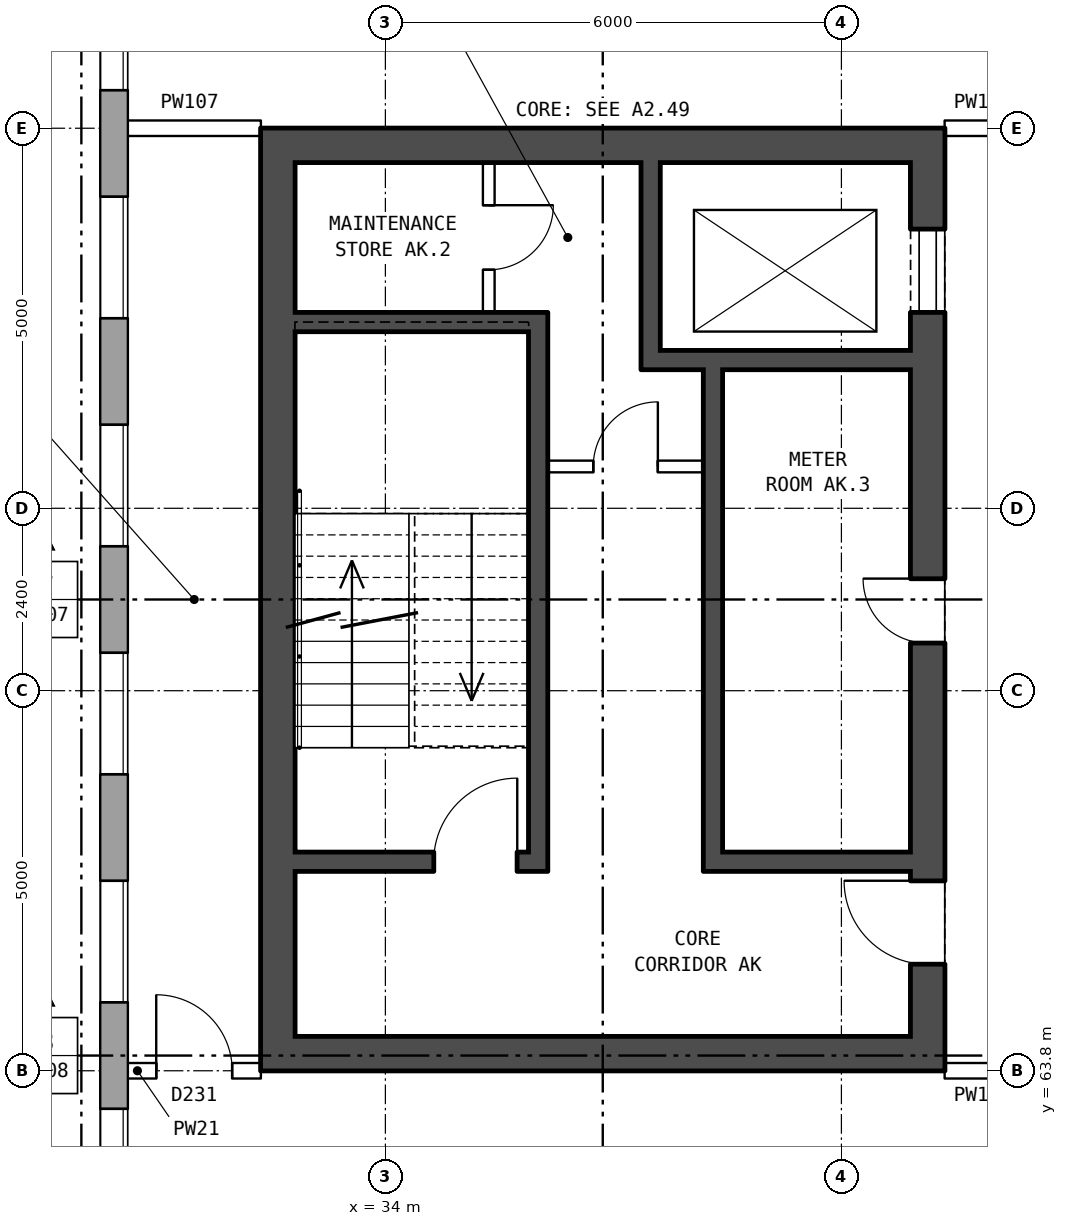
"""IFC4 building model, lengths in metres.
Left out: names, types, materials, properties, quantities, classifications, styles, units other than length and angle.
Written with IfcOpenShell. Run it as: python <this file> out.ifc"""

import sys

from ifc_helpers import new_model, si_unit, direction, frame, frame_2d, origin, place, context, subcontext, project, spatial, rectangle, extrude, element, fill, save


model = new_model("IFC4")
c1 = context("Model", 3, precision=1e-05, world=origin(), true_north=direction((0.0, 1.0)))
c2 = subcontext(c1, "Body", "Model", "MODEL_VIEW")
j1 = project(units=[si_unit("LENGTHUNIT", "METRE"), si_unit("PLANEANGLEUNIT", "RADIAN")], contexts=[c1])
p1 = place(None, origin())
s1 = spatial("IfcSite", under=j1, at=p1, CompositionType="ELEMENT")
p2 = place(p1, origin())
s2 = spatial("IfcBuilding", under=s1, at=p2, CompositionType="ELEMENT")
p3 = place(p2, frame((0.0, 0.0, 171.6)))
s3 = spatial("IfcBuildingStorey", under=s2, at=p3, CompositionType="ELEMENT", Elevation=171.6)
p4 = place(p3, frame((30.43, 82.925, 0.0), z_axis=(0.0, 0.0, 1.0), x_axis=(0.0, -1.0, 0.0)))
e1 = element("IfcWall", 1, at=p4, inside=s3, PredefinedType="STANDARD", context=c2, shape_type="SweptSolid", body=[
    extrude(rectangle(XDim=25.851, YDim=0.36, at=frame_2d((12.925, 0.0))), origin(), (0.0, 0.0, 1.0), 3.6),
])
p5 = place(p4, frame((1.625, 0.0, 0.8)))
e2 = element("IfcOpeningElement", 2, at=p5, cuts=e1, PredefinedType="OPENING", context=c2, shape_type="SweptSolid", body=[
    extrude(rectangle(XDim=1.6, YDim=1.8, at=frame_2d((0.8, 0.9))), frame((0.0, 0.19, 0.0), z_axis=(0.0, -1.0, 0.0), x_axis=(1.0, 0.0, 0.0)), (0.0, 0.0, 1.0), 0.38),
])
p6 = place(p4, frame((4.625, 0.0, 0.8)))
e3 = element("IfcOpeningElement", 3, at=p6, cuts=e1, PredefinedType="OPENING", context=c2, shape_type="SweptSolid", body=[
    extrude(rectangle(XDim=1.6, YDim=1.8, at=frame_2d((0.8, 0.9))), frame((0.0, 0.19, 0.0), z_axis=(0.0, -1.0, 0.0), x_axis=(1.0, 0.0, 0.0)), (0.0, 0.0, 1.0), 0.38),
])
p7 = place(p4, frame((7.625, 0.0, 0.8)))
e4 = element("IfcOpeningElement", 4, at=p7, cuts=e1, PredefinedType="OPENING", context=c2, shape_type="SweptSolid", body=[
    extrude(rectangle(XDim=1.6, YDim=1.8, at=frame_2d((0.8, 0.9))), frame((0.0, 0.19, 0.0), z_axis=(0.0, -1.0, 0.0), x_axis=(1.0, 0.0, 0.0)), (0.0, 0.0, 1.0), 0.38),
])
p8 = place(p4, frame((10.625, 0.0, 0.8)))
e5 = element("IfcOpeningElement", 5, at=p8, cuts=e1, PredefinedType="OPENING", context=c2, shape_type="SweptSolid", body=[
    extrude(rectangle(XDim=1.6, YDim=1.8, at=frame_2d((0.8, 0.9))), frame((0.0, 0.19, 0.0), z_axis=(0.0, -1.0, 0.0), x_axis=(1.0, 0.0, 0.0)), (0.0, 0.0, 1.0), 0.38),
])
p9 = place(p4, frame((13.625, 0.0, 0.8)))
e6 = element("IfcOpeningElement", 6, at=p9, cuts=e1, PredefinedType="OPENING", context=c2, shape_type="SweptSolid", body=[
    extrude(rectangle(XDim=1.6, YDim=1.8, at=frame_2d((0.8, 0.9))), frame((0.0, 0.19, 0.0), z_axis=(0.0, -1.0, 0.0), x_axis=(1.0, 0.0, 0.0)), (0.0, 0.0, 1.0), 0.38),
])
p10 = place(p4, frame((16.625, 0.0, 0.8)))
e7 = element("IfcOpeningElement", 7, at=p10, cuts=e1, PredefinedType="OPENING", context=c2, shape_type="SweptSolid", body=[
    extrude(rectangle(XDim=1.6, YDim=1.8, at=frame_2d((0.8, 0.9))), frame((0.0, 0.19, 0.0), z_axis=(0.0, -1.0, 0.0), x_axis=(1.0, 0.0, 0.0)), (0.0, 0.0, 1.0), 0.38),
])
p11 = place(p4, frame((19.625, 0.0, 0.8)))
e8 = element("IfcOpeningElement", 8, at=p11, cuts=e1, PredefinedType="OPENING", context=c2, shape_type="SweptSolid", body=[
    extrude(rectangle(XDim=1.6, YDim=1.8, at=frame_2d((0.8, 0.9))), frame((0.0, 0.19, 0.0), z_axis=(0.0, -1.0, 0.0), x_axis=(1.0, 0.0, 0.0)), (0.0, 0.0, 1.0), 0.38),
])
p12 = place(p4, frame((22.625, 0.0, 0.8)))
e9 = element("IfcOpeningElement", 9, at=p12, cuts=e1, PredefinedType="OPENING", context=c2, shape_type="SweptSolid", body=[
    extrude(rectangle(XDim=1.6, YDim=1.8, at=frame_2d((0.8, 0.9))), frame((0.0, 0.19, 0.0), z_axis=(0.0, -1.0, 0.0), x_axis=(1.0, 0.0, 0.0)), (0.0, 0.0, 1.0), 0.38),
])
p13 = place(p3, frame((41.135, 76.2, 0.0), z_axis=(0.0, 0.0, 1.0), x_axis=(0.0, -1.0, 0.0)))
e10 = element("IfcWall", 10, at=p13, inside=s3, PredefinedType="SHEAR", context=c2, shape_type="SweptSolid", body=[
    extrude(rectangle(XDim=12.4, YDim=0.45, at=frame_2d((6.2, 0.0))), origin(), (0.0, 0.0, 1.0), 3.6),
])
p14 = place(p13, frame((1.325, 0.0, 0.0)))
e11 = element("IfcOpeningElement", 11, at=p14, cuts=e10, PredefinedType="OPENING", context=c2, shape_type="SweptSolid", body=[
    extrude(rectangle(XDim=1.1, YDim=2.1, at=frame_2d((0.55, 1.05))), frame((0.0, 0.235, 0.0), z_axis=(0.0, -1.0, 0.0), x_axis=(1.0, 0.0, 0.0)), (0.0, 0.0, 1.0), 0.47),
])
p15 = place(p13, frame((5.925, 0.0, 0.0)))
e12 = element("IfcOpeningElement", 12, at=p15, cuts=e10, PredefinedType="OPENING", context=c2, shape_type="SweptSolid", body=[
    extrude(rectangle(XDim=0.85, YDim=2.1, at=frame_2d((0.425, 1.05))), frame((0.0, 0.235, 0.0), z_axis=(0.0, -1.0, 0.0), x_axis=(1.0, 0.0, 0.0)), (0.0, 0.0, 1.0), 0.47),
])
p16 = place(p13, frame((9.9, 0.0, 0.0)))
e13 = element("IfcOpeningElement", 13, at=p16, cuts=e10, PredefinedType="OPENING", context=c2, shape_type="SweptSolid", body=[
    extrude(rectangle(XDim=1.1, YDim=2.1, at=frame_2d((0.55, 1.05))), frame((0.0, 0.235, 0.0), z_axis=(0.0, -1.0, 0.0), x_axis=(1.0, 0.0, 0.0)), (0.0, 0.0, 1.0), 0.47),
])
p17 = place(p3, frame((32.585, 76.2, 0.0), z_axis=(0.0, 0.0, 1.0), x_axis=(0.0, -1.0, 0.0)))
e14 = element("IfcWall", 14, at=p17, inside=s3, PredefinedType="SHEAR", context=c2, shape_type="SweptSolid", body=[
    extrude(rectangle(XDim=12.4, YDim=0.45, at=frame_2d((6.2, 0.0))), origin(), (0.0, 0.0, 1.0), 3.6),
])
for number, where, z_axis, x_axis in (
    (15, (40.91, 75.975, 0.0), (0.0, 0.0, 1.0), (-1.0, 0.0, 0.0)),
    (16, (40.91, 64.025, 0.0), (0.0, 0.0, 1.0), (-1.0, 0.0, 0.0)),
):
    element("IfcWall", number, at=place(p3, frame(where, z_axis=z_axis, x_axis=x_axis)), inside=s3, PredefinedType="SHEAR", context=c2, shape_type="SweptSolid", body=[
        extrude(rectangle(XDim=8.1, YDim=0.45, at=frame_2d((4.05, 0.0))), origin(), (0.0, 0.0, 1.0), 3.6),
    ])
p18 = place(p3, frame((35.885, 73.65, 0.0), z_axis=(0.0, 0.0, 1.0), x_axis=(-1.0, 0.0, 0.0)))
e17 = element("IfcWall", 17, at=p18, inside=s3, PredefinedType="SHEAR", context=c2, shape_type="SweptSolid", body=[
    extrude(rectangle(XDim=3.075, YDim=0.25, at=frame_2d((1.538, 0.0))), origin(), (0.0, 0.0, 1.0), 3.6),
])
p19 = place(p3, frame((40.91, 73.15, 0.0), z_axis=(0.0, 0.0, 1.0), x_axis=(-1.0, 0.0, 0.0)))
e18 = element("IfcWall", 18, at=p19, inside=s3, PredefinedType="SHEAR", context=c2, shape_type="SweptSolid", body=[
    extrude(rectangle(XDim=3.545, YDim=0.25, at=frame_2d((1.772, 0.0))), origin(), (0.0, 0.0, 1.0), 3.6),
])
p20 = place(p3, frame((38.185, 71.75, 0.0), z_axis=(0.0, 0.0, 1.0), x_axis=(-1.0, 0.0, 0.0)))
e19 = element("IfcWall", 19, at=p20, inside=s3, PredefinedType="PARTITIONING", context=c2, shape_type="SweptSolid", body=[
    extrude(rectangle(XDim=2.05, YDim=0.15, at=frame_2d((1.025, 0.0))), origin(), (0.0, 0.0, 1.0), 3.6),
])
p21 = place(p20, frame((0.6, 0.0, 0.0)))
e20 = element("IfcOpeningElement", 20, at=p21, cuts=e19, PredefinedType="OPENING", context=c2, shape_type="SweptSolid", body=[
    extrude(rectangle(XDim=0.85, YDim=2.1, at=frame_2d((0.425, 1.05))), frame((0.0, 0.085, 0.0), z_axis=(0.0, -1.0, 0.0), x_axis=(1.0, 0.0, 0.0)), (0.0, 0.0, 1.0), 0.17),
])
p22 = place(p3, frame((40.91, 66.55, 0.0), z_axis=(0.0, 0.0, 1.0), x_axis=(-1.0, 0.0, 0.0)))
e21 = element("IfcWall", 21, at=p22, inside=s3, PredefinedType="SHEAR", context=c2, shape_type="SweptSolid", body=[
    extrude(rectangle(XDim=2.475, YDim=0.25, at=frame_2d((1.237, 0.0))), origin(), (0.0, 0.0, 1.0), 3.6),
])
p23 = place(p3, frame((35.885, 66.55, 0.0), z_axis=(0.0, 0.0, 1.0), x_axis=(-1.0, 0.0, 0.0)))
e22 = element("IfcWall", 22, at=p23, inside=s3, PredefinedType="SHEAR", context=c2, shape_type="SweptSolid", body=[
    extrude(rectangle(XDim=3.075, YDim=0.25, at=frame_2d((1.538, 0.0))), origin(), (0.0, 0.0, 1.0), 3.6),
])
p24 = place(p23, frame((0.15, 0.0, 0.0)))
e23 = element("IfcOpeningElement", 23, at=p24, cuts=e22, PredefinedType="OPENING", context=c2, shape_type="SweptSolid", body=[
    extrude(rectangle(XDim=1.1, YDim=2.1, at=frame_2d((0.55, 1.05))), frame((0.0, 0.135, 0.0), z_axis=(0.0, -1.0, 0.0), x_axis=(1.0, 0.0, 0.0)), (0.0, 0.0, 1.0), 0.27),
])
p25 = place(p3, frame((38.31, 73.025, 0.0), z_axis=(0.0, 0.0, 1.0), x_axis=(0.0, -1.0, 0.0)))
e24 = element("IfcWall", 24, at=p25, inside=s3, PredefinedType="SHEAR", context=c2, shape_type="SweptSolid", body=[
    extrude(rectangle(XDim=6.6, YDim=0.25, at=frame_2d((3.3, 0.0))), origin(), (0.0, 0.0, 1.0), 3.6),
])
p26 = place(p3, frame((37.49, 75.75, 0.0), z_axis=(0.0, 0.0, 1.0), x_axis=(0.0, -1.0, 0.0)))
e25 = element("IfcWall", 25, at=p26, inside=s3, PredefinedType="SHEAR", context=c2, shape_type="SweptSolid", body=[
    extrude(rectangle(XDim=2.475, YDim=0.25, at=frame_2d((1.238, 0.0))), origin(), (0.0, 0.0, 1.0), 3.6),
])
p27 = place(p3, frame((36.01, 73.775, 0.0), z_axis=(0.0, 0.0, 1.0), x_axis=(0.0, -1.0, 0.0)))
e26 = element("IfcWall", 26, at=p27, inside=s3, PredefinedType="SHEAR", context=c2, shape_type="SweptSolid", body=[
    extrude(rectangle(XDim=7.35, YDim=0.25, at=frame_2d((3.675, 0.0))), origin(), (0.0, 0.0, 1.0), 3.6),
])
p28 = place(p3, frame((35.36, 75.75, 0.0), z_axis=(0.0, 0.0, 1.0), x_axis=(0.0, -1.0, 0.0)))
e27 = element("IfcWall", 27, at=p28, inside=s3, PredefinedType="PARTITIONING", context=c2, shape_type="SweptSolid", body=[
    extrude(rectangle(XDim=1.975, YDim=0.15, at=frame_2d((0.988, 0.0))), origin(), (0.0, 0.0, 1.0), 3.6),
])
p29 = place(p28, frame((0.562, 0.0, 0.0)))
e28 = element("IfcOpeningElement", 28, at=p29, cuts=e27, PredefinedType="OPENING", context=c2, shape_type="SweptSolid", body=[
    extrude(rectangle(XDim=0.85, YDim=2.1, at=frame_2d((0.425, 1.05))), frame((0.0, 0.085, 0.0), z_axis=(0.0, -1.0, 0.0), x_axis=(1.0, 0.0, 0.0)), (0.0, 0.0, 1.0), 0.17),
])
p30 = place(p3, frame((30.49, 63.8, 0.0), z_axis=(0.0, 0.0, 1.0), x_axis=(1.0, 0.0, 0.0)))
e29 = element("IfcWall", 29, at=p30, inside=s3, PredefinedType="PARTITIONING", context=c2, shape_type="SweptSolid", body=[
    extrude(rectangle(XDim=1.87, YDim=0.2, at=frame_2d((0.935, 0.0))), origin(), (0.0, 0.0, 1.0), 3.6),
])
p31 = place(p30, frame((0.495, 0.0, 0.0)))
e30 = element("IfcOpeningElement", 30, at=p31, cuts=e29, PredefinedType="OPENING", context=c2, shape_type="SweptSolid", body=[
    extrude(rectangle(XDim=1.0, YDim=2.1, at=frame_2d((0.5, 1.05))), frame((0.0, 0.11, 0.0), z_axis=(0.0, -1.0, 0.0), x_axis=(1.0, 0.0, 0.0)), (0.0, 0.0, 1.0), 0.22),
])
p32 = place(p3, frame((41.36, 63.8, 0.0), z_axis=(0.0, 0.0, 1.0), x_axis=(1.0, 0.0, 0.0)))
e31 = element("IfcWall", 31, at=p32, inside=s3, PredefinedType="PARTITIONING", context=c2, shape_type="SweptSolid", body=[
    extrude(rectangle(XDim=3.0, YDim=0.2, at=frame_2d((1.5, 0.0))), origin(), (0.0, 0.0, 1.0), 3.6),
])
p33 = place(p32, frame((1.0, 0.0, 0.0)))
e32 = element("IfcOpeningElement", 32, at=p33, cuts=e31, PredefinedType="OPENING", context=c2, shape_type="SweptSolid", body=[
    extrude(rectangle(XDim=1.0, YDim=2.1, at=frame_2d((0.5, 1.05))), frame((0.0, 0.11, 0.0), z_axis=(0.0, -1.0, 0.0), x_axis=(1.0, 0.0, 0.0)), (0.0, 0.0, 1.0), 0.22),
])
p34 = place(p3, frame((30.49, 76.2, 0.0), z_axis=(0.0, 0.0, 1.0), x_axis=(1.0, 0.0, 0.0)))
e33 = element("IfcWall", 33, at=p34, inside=s3, PredefinedType="PARTITIONING", context=c2, shape_type="SweptSolid", body=[
    extrude(rectangle(XDim=1.87, YDim=0.2, at=frame_2d((0.935, 0.0))), origin(), (0.0, 0.0, 1.0), 3.6),
])
p35 = place(p3, frame((41.36, 76.2, 0.0), z_axis=(0.0, 0.0, 1.0), x_axis=(1.0, 0.0, 0.0)))
e34 = element("IfcWall", 34, at=p35, inside=s3, PredefinedType="PARTITIONING", context=c2, shape_type="SweptSolid", body=[
    extrude(rectangle(XDim=3.0, YDim=0.2, at=frame_2d((1.5, 0.0))), origin(), (0.0, 0.0, 1.0), 3.6),
])
p36 = place(p35, frame((1.0, 0.0, 0.0)))
e35 = element("IfcOpeningElement", 35, at=p36, cuts=e34, PredefinedType="OPENING", context=c2, shape_type="SweptSolid", body=[
    extrude(rectangle(XDim=1.0, YDim=2.1, at=frame_2d((0.5, 1.05))), frame((0.0, 0.11, 0.0), z_axis=(0.0, -1.0, 0.0), x_axis=(1.0, 0.0, 0.0)), (0.0, 0.0, 1.0), 0.22),
])
p37 = place(p6, origin())
e36 = element("IfcWindow", 36, at=p37, inside=s3, PartitioningType="SINGLE_PANEL", PredefinedType="WINDOW", context=c2, shape_type="SweptSolid", body=[
    extrude(rectangle(XDim=1.6, YDim=1.8, at=frame_2d((0.8, 0.9))), frame((0.0, 0.15, 0.0), z_axis=(0.0, -1.0, 0.0), x_axis=(1.0, 0.0, 0.0)), (0.0, 0.0, 1.0), 0.06),
])
fill(e3, e36)
p38 = place(p7, origin())
e37 = element("IfcWindow", 37, at=p38, inside=s3, PartitioningType="SINGLE_PANEL", PredefinedType="WINDOW", context=c2, shape_type="SweptSolid", body=[
    extrude(rectangle(XDim=1.6, YDim=1.8, at=frame_2d((0.8, 0.9))), frame((0.0, 0.15, 0.0), z_axis=(0.0, -1.0, 0.0), x_axis=(1.0, 0.0, 0.0)), (0.0, 0.0, 1.0), 0.06),
])
fill(e4, e37)
p39 = place(p8, origin())
e38 = element("IfcWindow", 38, at=p39, inside=s3, PartitioningType="SINGLE_PANEL", PredefinedType="WINDOW", context=c2, shape_type="SweptSolid", body=[
    extrude(rectangle(XDim=1.6, YDim=1.8, at=frame_2d((0.8, 0.9))), frame((0.0, 0.15, 0.0), z_axis=(0.0, -1.0, 0.0), x_axis=(1.0, 0.0, 0.0)), (0.0, 0.0, 1.0), 0.06),
])
fill(e5, e38)
p40 = place(p9, origin())
e39 = element("IfcWindow", 39, at=p40, inside=s3, PartitioningType="SINGLE_PANEL", PredefinedType="WINDOW", context=c2, shape_type="SweptSolid", body=[
    extrude(rectangle(XDim=1.6, YDim=1.8, at=frame_2d((0.8, 0.9))), frame((0.0, 0.15, 0.0), z_axis=(0.0, -1.0, 0.0), x_axis=(1.0, 0.0, 0.0)), (0.0, 0.0, 1.0), 0.06),
])
fill(e6, e39)
p41 = place(p10, origin())
e40 = element("IfcWindow", 40, at=p41, inside=s3, PartitioningType="SINGLE_PANEL", PredefinedType="WINDOW", context=c2, shape_type="SweptSolid", body=[
    extrude(rectangle(XDim=1.6, YDim=1.8, at=frame_2d((0.8, 0.9))), frame((0.0, 0.15, 0.0), z_axis=(0.0, -1.0, 0.0), x_axis=(1.0, 0.0, 0.0)), (0.0, 0.0, 1.0), 0.06),
])
fill(e7, e40)
p42 = place(p11, origin())
e41 = element("IfcWindow", 41, at=p42, inside=s3, PartitioningType="SINGLE_PANEL", PredefinedType="WINDOW", context=c2, shape_type="SweptSolid", body=[
    extrude(rectangle(XDim=1.6, YDim=1.8, at=frame_2d((0.8, 0.9))), frame((0.0, 0.15, 0.0), z_axis=(0.0, -1.0, 0.0), x_axis=(1.0, 0.0, 0.0)), (0.0, 0.0, 1.0), 0.06),
])
fill(e8, e41)
p43 = place(p14, origin())
e42 = element("IfcDoor", 42, at=p43, inside=s3, OperationType="DOUBLE_DOOR_SLIDING", PredefinedType="DOOR", context=c2, shape_type="SweptSolid", body=[
    extrude(rectangle(XDim=1.1, YDim=2.1, at=frame_2d((0.55, 1.05))), frame((0.0, -0.16, 0.0), z_axis=(0.0, -1.0, 0.0), x_axis=(1.0, 0.0, 0.0)), (0.0, 0.0, 1.0), 0.05),
])
fill(e11, e42)
p44 = place(p15, frame((0.85, 0.0, 0.0), z_axis=(0.0, 0.0, 1.0), x_axis=(-1.0, 0.0, 0.0)))
e43 = element("IfcDoor", 43, at=p44, inside=s3, OperationType="SINGLE_SWING_RIGHT", PredefinedType="DOOR", context=c2, shape_type="SweptSolid", body=[
    extrude(rectangle(XDim=0.85, YDim=2.1, at=frame_2d((0.425, 1.05))), frame((0.0, 0.21, 0.0), z_axis=(0.0, -1.0, 0.0), x_axis=(1.0, 0.0, 0.0)), (0.0, 0.0, 1.0), 0.05),
])
fill(e12, e43)
p45 = place(p16, frame((1.1, 0.0, 0.0), z_axis=(0.0, 0.0, 1.0), x_axis=(-1.0, 0.0, 0.0)))
e44 = element("IfcDoor", 44, at=p45, inside=s3, OperationType="SINGLE_SWING_RIGHT", PredefinedType="DOOR", context=c2, shape_type="SweptSolid", body=[
    extrude(rectangle(XDim=1.1, YDim=2.1, at=frame_2d((0.55, 1.05))), frame((0.0, 0.21, 0.0), z_axis=(0.0, -1.0, 0.0), x_axis=(1.0, 0.0, 0.0)), (0.0, 0.0, 1.0), 0.05),
])
fill(e13, e44)
p46 = place(p24, frame((1.1, 0.0, 0.0), z_axis=(0.0, 0.0, 1.0), x_axis=(-1.0, 0.0, 0.0)))
e45 = element("IfcDoor", 45, at=p46, inside=s3, OperationType="SINGLE_SWING_RIGHT", PredefinedType="DOOR", context=c2, shape_type="SweptSolid", body=[
    extrude(rectangle(XDim=1.1, YDim=2.1, at=frame_2d((0.55, 1.05))), frame((0.0, 0.025, 0.0), z_axis=(0.0, -1.0, 0.0), x_axis=(1.0, 0.0, 0.0)), (0.0, 0.0, 1.0), 0.05),
])
fill(e23, e45)
p47 = place(p21, frame((0.85, 0.0, 0.0), z_axis=(0.0, 0.0, 1.0), x_axis=(-1.0, 0.0, 0.0)))
e46 = element("IfcDoor", 46, at=p47, inside=s3, OperationType="SINGLE_SWING_RIGHT", PredefinedType="DOOR", context=c2, shape_type="SweptSolid", body=[
    extrude(rectangle(XDim=0.85, YDim=2.1, at=frame_2d((0.425, 1.05))), frame((0.0, 0.025, 0.0), z_axis=(0.0, -1.0, 0.0), x_axis=(1.0, 0.0, 0.0)), (0.0, 0.0, 1.0), 0.05),
])
fill(e20, e46)
p48 = place(p29, origin())
e47 = element("IfcDoor", 47, at=p48, inside=s3, OperationType="SINGLE_SWING_LEFT", PredefinedType="DOOR", context=c2, shape_type="SweptSolid", body=[
    extrude(rectangle(XDim=0.85, YDim=2.1, at=frame_2d((0.425, 1.05))), frame((0.0, 0.025, 0.0), z_axis=(0.0, -1.0, 0.0), x_axis=(1.0, 0.0, 0.0)), (0.0, 0.0, 1.0), 0.05),
])
fill(e28, e47)
p49 = place(p31, origin())
e48 = element("IfcDoor", 48, at=p49, inside=s3, OperationType="SINGLE_SWING_LEFT", PredefinedType="DOOR", context=c2, shape_type="SweptSolid", body=[
    extrude(rectangle(XDim=1.0, YDim=2.1, at=frame_2d((0.5, 1.05))), frame((0.0, 0.025, 0.0), z_axis=(0.0, -1.0, 0.0), x_axis=(1.0, 0.0, 0.0)), (0.0, 0.0, 1.0), 0.05),
])
fill(e30, e48)
save(model, sys.argv[1])
